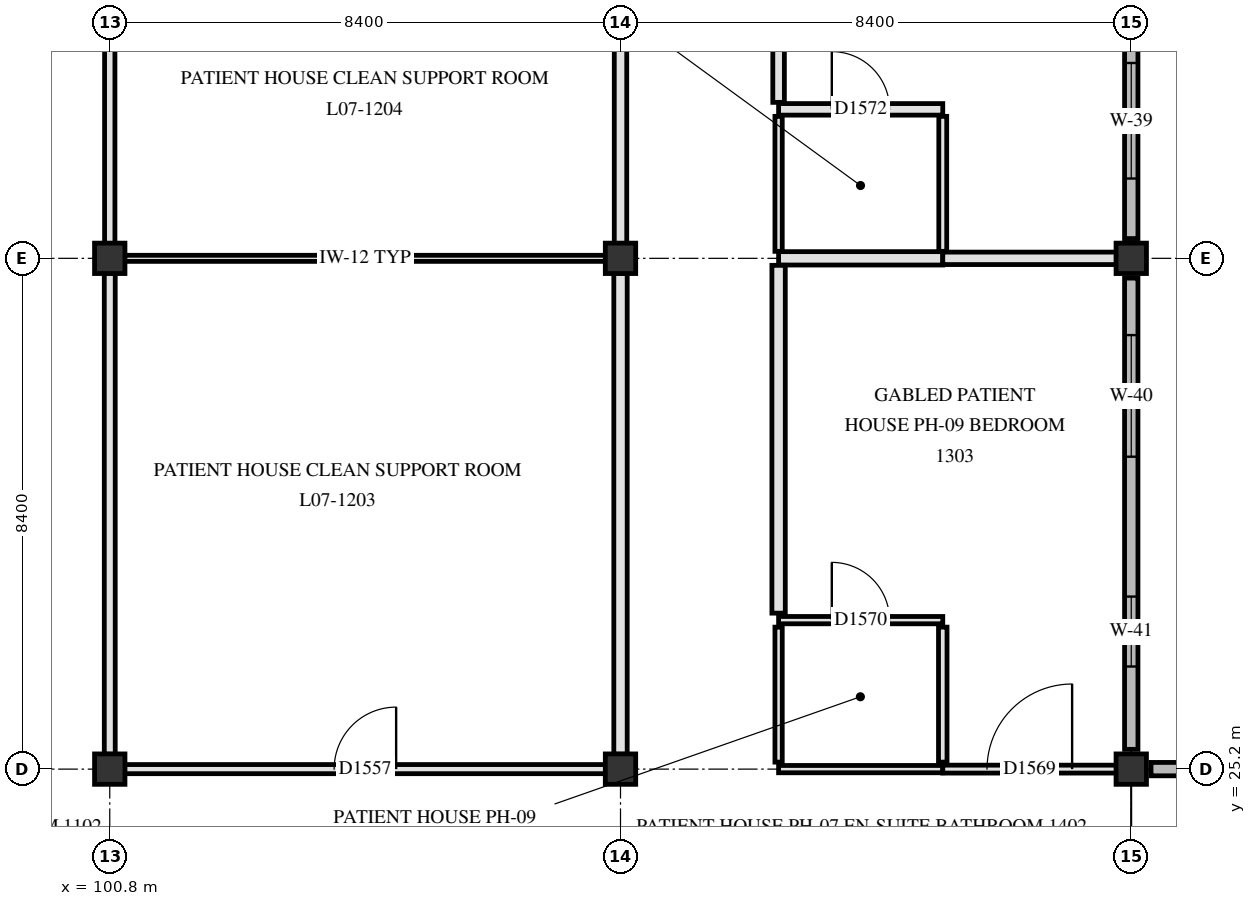
"""IFC4 building model, lengths in metres.
Left out: names, types, materials, properties, quantities, classifications, styles, units other than length and angle.
Written with IfcOpenShell. Run it as: python <this file> out.ifc"""

import sys

from ifc_helpers import new_model, si_unit, direction, frame, frame_2d, origin, origin_2d, place, context, subcontext, project, spatial, polyline, rectangle, outline, extrude, element, fill, save


model = new_model("IFC4")
c1 = context("Model", 3, precision=1e-05, world=origin(), true_north=direction((0.0, 1.0)))
c2 = subcontext(c1, "Body", "Model", "MODEL_VIEW")
j1 = project(units=[si_unit("LENGTHUNIT", "METRE"), si_unit("PLANEANGLEUNIT", "RADIAN")], contexts=[c1])
p1 = place(None, origin())
s1 = spatial("IfcSite", under=j1, at=p1, CompositionType="ELEMENT")
p2 = place(p1, origin())
s2 = spatial("IfcBuilding", under=s1, at=p2, CompositionType="ELEMENT")
p3 = place(p2, frame((0.0, 0.0, 30.3)))
s3 = spatial("IfcBuildingStorey", under=s2, at=p3, CompositionType="ELEMENT", Elevation=30.3)
for number, where, z_axis, x_axis in (
    (1, (100.8, 25.2, 0.0), (0.0, 0.0, 1.0), (1.0, 0.0, 0.0)),
    (2, (100.8, 33.6, 0.0), (0.0, 0.0, 1.0), (1.0, 0.0, 0.0)),
    (3, (109.2, 25.2, 0.0), (0.0, 0.0, 1.0), (1.0, 0.0, 0.0)),
    (4, (109.2, 33.6, 0.0), (0.0, 0.0, 1.0), (1.0, 0.0, 0.0)),
    (5, (117.6, 25.2, 0.0), (0.0, 0.0, 1.0), (1.0, 0.0, 0.0)),
    (6, (117.6, 33.6, 0.0), (0.0, 0.0, 1.0), (1.0, 0.0, 0.0)),
):
    element("IfcColumn", number, at=place(p3, frame(where, z_axis=z_axis, x_axis=x_axis)), inside=s3, PredefinedType="COLUMN", context=c2, shape_type="SweptSolid", body=[
        extrude(rectangle(XDim=0.5, YDim=0.5, at=origin_2d()), origin(), (0.0, 0.0, 1.0), 3.9),
    ])
p4 = place(p3, frame((117.6, 41.675, 0.0), z_axis=(0.0, 0.0, 1.0), x_axis=(0.0, -1.0, 0.0)))
e7 = element("IfcWall", 7, at=p4, inside=s3, PredefinedType="SOLIDWALL", context=c2, shape_type="SweptSolid", body=[
    extrude(outline(polyline([(0.0, 0.0), (7.75, 0.0), (7.75, 3.42), (3.875, 5.76), (0.0, 3.42), (0.0, 0.0)])), frame((0.0, 0.11, 0.0), z_axis=(0.0, -1.0, 0.0), x_axis=(1.0, 0.0, 0.0)), (0.0, 0.0, 1.0), 0.22),
])
p5 = place(p4, frame((1.038, 0.0, 0.85)))
e8 = element("IfcOpeningElement", 8, at=p5, cuts=e7, PredefinedType="OPENING", context=c2, shape_type="SweptSolid", body=[
    extrude(rectangle(XDim=1.8, YDim=1.66, at=frame_2d((0.9, 0.83))), frame((0.0, 0.12, 0.0), z_axis=(0.0, -1.0, 0.0), x_axis=(1.0, 0.0, 0.0)), (0.0, 0.0, 1.0), 0.24),
])
p6 = place(p4, frame((4.863, 0.0, 0.85)))
e9 = element("IfcOpeningElement", 9, at=p6, cuts=e7, PredefinedType="OPENING", context=c2, shape_type="SweptSolid", body=[
    extrude(rectangle(XDim=1.9, YDim=1.66, at=frame_2d((0.95, 0.83))), frame((0.0, 0.12, 0.0), z_axis=(0.0, -1.0, 0.0), x_axis=(1.0, 0.0, 0.0)), (0.0, 0.0, 1.0), 0.24),
])
p7 = place(p3, frame((117.6, 33.275, 0.0), z_axis=(0.0, 0.0, 1.0), x_axis=(0.0, -1.0, 0.0)))
e10 = element("IfcWall", 10, at=p7, inside=s3, PredefinedType="SOLIDWALL", context=c2, shape_type="SweptSolid", body=[
    extrude(outline(polyline([(0.0, 0.0), (7.75, 0.0), (7.75, 3.42), (3.875, 5.76), (0.0, 3.42), (0.0, 0.0)])), frame((0.0, 0.11, 0.0), z_axis=(0.0, -1.0, 0.0), x_axis=(1.0, 0.0, 0.0)), (0.0, 0.0, 1.0), 0.22),
])
p8 = place(p7, frame((0.938, 0.0, 0.85)))
e11 = element("IfcOpeningElement", 11, at=p8, cuts=e10, PredefinedType="OPENING", context=c2, shape_type="SweptSolid", body=[
    extrude(rectangle(XDim=2.0, YDim=1.66, at=frame_2d((1.0, 0.83))), frame((0.0, 0.12, 0.0), z_axis=(0.0, -1.0, 0.0), x_axis=(1.0, 0.0, 0.0)), (0.0, 0.0, 1.0), 0.24),
])
p9 = place(p7, frame((5.238, 0.0, 0.85)))
e12 = element("IfcOpeningElement", 12, at=p9, cuts=e10, PredefinedType="OPENING", context=c2, shape_type="SweptSolid", body=[
    extrude(rectangle(XDim=1.15, YDim=1.78, at=frame_2d((0.575, 0.89))), frame((0.0, 0.12, 0.0), z_axis=(0.0, -1.0, 0.0), x_axis=(1.0, 0.0, 0.0)), (0.0, 0.0, 1.0), 0.24),
])
p10 = place(p3, frame((117.925, 25.2, 0.0), z_axis=(0.0, 0.0, 1.0), x_axis=(1.0, 0.0, 0.0)))
e13 = element("IfcWall", 13, at=p10, inside=s3, PredefinedType="SOLIDWALL", context=c2, shape_type="SweptSolid", body=[
    extrude(outline(polyline([(0.0, 0.0), (7.75, 0.0), (7.75, 3.4), (3.875, 5.76), (0.0, 3.4), (0.0, 0.0)])), frame((0.0, 0.11, 0.0), z_axis=(0.0, -1.0, 0.0), x_axis=(1.0, 0.0, 0.0)), (0.0, 0.0, 1.0), 0.22),
])
p11 = place(p10, frame((1.288, 0.0, 0.85)))
e14 = element("IfcOpeningElement", 14, at=p11, cuts=e13, PredefinedType="OPENING", context=c2, shape_type="SweptSolid", body=[
    extrude(rectangle(XDim=1.3, YDim=1.78, at=frame_2d((0.65, 0.89))), frame((0.0, 0.12, 0.0), z_axis=(0.0, -1.0, 0.0), x_axis=(1.0, 0.0, 0.0)), (0.0, 0.0, 1.0), 0.24),
])
p12 = place(p10, frame((5.087, 0.0, 0.85)))
e15 = element("IfcOpeningElement", 15, at=p12, cuts=e13, PredefinedType="OPENING", context=c2, shape_type="SweptSolid", body=[
    extrude(rectangle(XDim=1.45, YDim=1.78, at=frame_2d((0.725, 0.89))), frame((0.0, 0.12, 0.0), z_axis=(0.0, -1.0, 0.0), x_axis=(1.0, 0.0, 0.0)), (0.0, 0.0, 1.0), 0.24),
])
p13 = place(p3, frame((101.045, 25.2, 0.0), z_axis=(0.0, 0.0, 1.0), x_axis=(1.0, 0.0, 0.0)))
e16 = element("IfcWall", 16, at=p13, inside=s3, PredefinedType="PARTITIONING", context=c2, shape_type="SweptSolid", body=[
    extrude(rectangle(XDim=7.91, YDim=0.15, at=frame_2d((3.955, 0.0))), origin(), (0.0, 0.0, 1.0), 3.25),
])
p14 = place(p13, frame((3.445, 0.0, 0.0)))
e17 = element("IfcOpeningElement", 17, at=p14, cuts=e16, PredefinedType="OPENING", context=c2, shape_type="SweptSolid", body=[
    extrude(rectangle(XDim=1.02, YDim=2.12, at=frame_2d((0.51, 1.06))), frame((0.0, 0.085, 0.0), z_axis=(0.0, -1.0, 0.0), x_axis=(1.0, 0.0, 0.0)), (0.0, 0.0, 1.0), 0.17),
])
p15 = place(p3, frame((111.8, 25.2, 0.0), z_axis=(0.0, 0.0, 1.0), x_axis=(1.0, 0.0, 0.0)))
e18 = element("IfcWall", 18, at=p15, inside=s3, PredefinedType="PARTITIONING", context=c2, shape_type="SweptSolid", body=[
    extrude(rectangle(XDim=2.7, YDim=0.12, at=frame_2d((1.35, 0.0))), origin(), (0.0, 0.0, 1.0), 3.25),
])
p16 = place(p3, frame((114.5, 25.2, 0.0), z_axis=(0.0, 0.0, 1.0), x_axis=(1.0, 0.0, 0.0)))
e19 = element("IfcWall", 19, at=p16, inside=s3, PredefinedType="PARTITIONING", context=c2, shape_type="SweptSolid", body=[
    extrude(rectangle(XDim=2.855, YDim=0.13, at=frame_2d((1.427, 0.0))), origin(), (0.0, 0.0, 1.0), 3.25),
])
p17 = place(p16, frame((0.728, 0.0, 0.0)))
e20 = element("IfcOpeningElement", 20, at=p17, cuts=e19, PredefinedType="OPENING", context=c2, shape_type="SweptSolid", body=[
    extrude(rectangle(XDim=1.4, YDim=2.2, at=frame_2d((0.7, 1.1))), frame((0.0, 0.075, 0.0), z_axis=(0.0, -1.0, 0.0), x_axis=(1.0, 0.0, 0.0)), (0.0, 0.0, 1.0), 0.15),
])
p18 = place(p3, frame((111.8, 27.65, 0.0), z_axis=(0.0, 0.0, 1.0), x_axis=(1.0, 0.0, 0.0)))
e21 = element("IfcWall", 21, at=p18, inside=s3, PredefinedType="PARTITIONING", context=c2, shape_type="SweptSolid", body=[
    extrude(rectangle(XDim=2.7, YDim=0.12, at=frame_2d((1.35, 0.0))), origin(), (0.0, 0.0, 1.0), 3.65),
])
p19 = place(p18, frame((0.875, 0.0, 0.0)))
e22 = element("IfcOpeningElement", 22, at=p19, cuts=e21, PredefinedType="OPENING", context=c2, shape_type="SweptSolid", body=[
    extrude(rectangle(XDim=0.95, YDim=2.1, at=frame_2d((0.475, 1.05))), frame((0.0, 0.07, 0.0), z_axis=(0.0, -1.0, 0.0), x_axis=(1.0, 0.0, 0.0)), (0.0, 0.0, 1.0), 0.14),
])
p20 = place(p3, frame((101.045, 33.6, 0.0), z_axis=(0.0, 0.0, 1.0), x_axis=(1.0, 0.0, 0.0)))
e23 = element("IfcWall", 23, at=p20, inside=s3, PredefinedType="PARTITIONING", context=c2, shape_type="SweptSolid", body=[
    extrude(rectangle(XDim=7.91, YDim=0.1, at=frame_2d((3.955, 0.0))), origin(), (0.0, 0.0, 1.0), 3.25),
])
p21 = place(p3, frame((111.8, 33.6, 0.0), z_axis=(0.0, 0.0, 1.0), x_axis=(1.0, 0.0, 0.0)))
e24 = element("IfcWall", 24, at=p21, inside=s3, PredefinedType="PARTITIONING", context=c2, shape_type="SweptSolid", body=[
    extrude(rectangle(XDim=2.7, YDim=0.22, at=frame_2d((1.35, 0.0))), origin(), (0.0, 0.0, 1.0), 3.25),
])
p22 = place(p3, frame((114.5, 33.6, 0.0), z_axis=(0.0, 0.0, 1.0), x_axis=(1.0, 0.0, 0.0)))
e25 = element("IfcWall", 25, at=p22, inside=s3, PredefinedType="PARTITIONING", context=c2, shape_type="SweptSolid", body=[
    extrude(rectangle(XDim=2.855, YDim=0.205, at=frame_2d((1.427, 0.0))), origin(), (0.0, 0.0, 1.0), 3.25),
])
p23 = place(p3, frame((111.8, 36.05, 0.0), z_axis=(0.0, 0.0, 1.0), x_axis=(1.0, 0.0, 0.0)))
e26 = element("IfcWall", 26, at=p23, inside=s3, PredefinedType="PARTITIONING", context=c2, shape_type="SweptSolid", body=[
    extrude(rectangle(XDim=2.7, YDim=0.19, at=frame_2d((1.35, 0.0))), origin(), (0.0, 0.0, 1.0), 3.65),
])
p24 = place(p23, frame((0.875, 0.0, 0.0)))
e27 = element("IfcOpeningElement", 27, at=p24, cuts=e26, PredefinedType="OPENING", context=c2, shape_type="SweptSolid", body=[
    extrude(rectangle(XDim=0.95, YDim=2.1, at=frame_2d((0.475, 1.05))), frame((0.0, 0.105, 0.0), z_axis=(0.0, -1.0, 0.0), x_axis=(1.0, 0.0, 0.0)), (0.0, 0.0, 1.0), 0.21),
])
p25 = place(p3, frame((100.8, 25.445, 0.0), z_axis=(0.0, 0.0, 1.0), x_axis=(0.0, 1.0, 0.0)))
e28 = element("IfcWall", 28, at=p25, inside=s3, PredefinedType="PARTITIONING", context=c2, shape_type="SweptSolid", body=[
    extrude(rectangle(XDim=7.91, YDim=0.18, at=frame_2d((3.955, 0.0))), origin(), (0.0, 0.0, 1.0), 3.25),
])
p26 = place(p3, frame((100.8, 33.845, 0.0), z_axis=(0.0, 0.0, 1.0), x_axis=(0.0, 1.0, 0.0)))
e29 = element("IfcWall", 29, at=p26, inside=s3, PredefinedType="PARTITIONING", context=c2, shape_type="SweptSolid", body=[
    extrude(rectangle(XDim=7.91, YDim=0.17, at=frame_2d((3.955, 0.0))), origin(), (0.0, 0.0, 1.0), 3.25),
])
p27 = place(p3, frame((109.2, 25.445, 0.0), z_axis=(0.0, 0.0, 1.0), x_axis=(0.0, 1.0, 0.0)))
e30 = element("IfcWall", 30, at=p27, inside=s3, PredefinedType="PARTITIONING", context=c2, shape_type="SweptSolid", body=[
    extrude(rectangle(XDim=7.91, YDim=0.22, at=frame_2d((3.955, 0.0))), origin(), (0.0, 0.0, 1.0), 3.25),
])
p28 = place(p3, frame((109.2, 33.845, 0.0), z_axis=(0.0, 0.0, 1.0), x_axis=(0.0, 1.0, 0.0)))
e31 = element("IfcWall", 31, at=p28, inside=s3, PredefinedType="PARTITIONING", context=c2, shape_type="SweptSolid", body=[
    extrude(rectangle(XDim=7.91, YDim=0.205, at=frame_2d((3.955, 0.0))), origin(), (0.0, 0.0, 1.0), 3.25),
])
p29 = place(p3, frame((111.8, 25.315, 0.0), z_axis=(0.0, 0.0, 1.0), x_axis=(0.0, 1.0, 0.0)))
e32 = element("IfcWall", 32, at=p29, inside=s3, PredefinedType="PARTITIONING", context=c2, shape_type="SweptSolid", body=[
    extrude(rectangle(XDim=2.22, YDim=0.12, at=frame_2d((1.11, 0.0))), origin(), (0.0, 0.0, 1.0), 3.65),
])
p30 = place(p3, frame((111.8, 27.765, 0.0), z_axis=(0.0, 0.0, 1.0), x_axis=(0.0, 1.0, 0.0)))
e33 = element("IfcWall", 33, at=p30, inside=s3, PredefinedType="PARTITIONING", context=c2, shape_type="SweptSolid", body=[
    extrude(rectangle(XDim=5.72, YDim=0.22, at=frame_2d((2.86, 0.0))), origin(), (0.0, 0.0, 1.0), 3.41),
])
p31 = place(p3, frame((111.8, 33.715, 0.0), z_axis=(0.0, 0.0, 1.0), x_axis=(0.0, 1.0, 0.0)))
e34 = element("IfcWall", 34, at=p31, inside=s3, PredefinedType="PARTITIONING", context=c2, shape_type="SweptSolid", body=[
    extrude(rectangle(XDim=2.22, YDim=0.12, at=frame_2d((1.11, 0.0))), origin(), (0.0, 0.0, 1.0), 3.65),
])
p32 = place(p3, frame((111.8, 36.165, 0.0), z_axis=(0.0, 0.0, 1.0), x_axis=(0.0, 1.0, 0.0)))
e35 = element("IfcWall", 35, at=p32, inside=s3, PredefinedType="PARTITIONING", context=c2, shape_type="SweptSolid", body=[
    extrude(rectangle(XDim=5.72, YDim=0.19, at=frame_2d((2.86, 0.0))), origin(), (0.0, 0.0, 1.0), 3.41),
])
p33 = place(p3, frame((114.5, 25.315, 0.0), z_axis=(0.0, 0.0, 1.0), x_axis=(0.0, 1.0, 0.0)))
e36 = element("IfcWall", 36, at=p33, inside=s3, PredefinedType="PARTITIONING", context=c2, shape_type="SweptSolid", body=[
    extrude(rectangle(XDim=2.22, YDim=0.14, at=frame_2d((1.11, 0.0))), origin(), (0.0, 0.0, 1.0), 3.65),
])
p34 = place(p3, frame((114.5, 33.715, 0.0), z_axis=(0.0, 0.0, 1.0), x_axis=(0.0, 1.0, 0.0)))
e37 = element("IfcWall", 37, at=p34, inside=s3, PredefinedType="PARTITIONING", context=c2, shape_type="SweptSolid", body=[
    extrude(rectangle(XDim=2.22, YDim=0.13, at=frame_2d((1.11, 0.0))), origin(), (0.0, 0.0, 1.0), 3.65),
])
p35 = place(p6, origin())
e38 = element("IfcWindow", 38, at=p35, inside=s3, PartitioningType="SINGLE_PANEL", PredefinedType="WINDOW", context=c2, shape_type="SweptSolid", body=[
    extrude(rectangle(XDim=1.9, YDim=1.66, at=frame_2d((0.95, 0.83))), frame((0.0, 0.03, 0.0), z_axis=(0.0, -1.0, 0.0), x_axis=(1.0, 0.0, 0.0)), (0.0, 0.0, 1.0), 0.06),
])
fill(e9, e38)
p36 = place(p8, origin())
e39 = element("IfcWindow", 39, at=p36, inside=s3, PartitioningType="SINGLE_PANEL", PredefinedType="WINDOW", context=c2, shape_type="SweptSolid", body=[
    extrude(rectangle(XDim=2.0, YDim=1.66, at=frame_2d((1.0, 0.83))), frame((0.0, 0.03, 0.0), z_axis=(0.0, -1.0, 0.0), x_axis=(1.0, 0.0, 0.0)), (0.0, 0.0, 1.0), 0.06),
])
fill(e11, e39)
p37 = place(p9, origin())
e40 = element("IfcWindow", 40, at=p37, inside=s3, PartitioningType="SINGLE_PANEL", PredefinedType="WINDOW", context=c2, shape_type="SweptSolid", body=[
    extrude(rectangle(XDim=1.15, YDim=1.78, at=frame_2d((0.575, 0.89))), frame((0.0, 0.03, 0.0), z_axis=(0.0, -1.0, 0.0), x_axis=(1.0, 0.0, 0.0)), (0.0, 0.0, 1.0), 0.06),
])
fill(e12, e40)
p38 = place(p14, origin())
e41 = element("IfcDoor", 41, at=p38, inside=s3, OperationType="SINGLE_SWING_RIGHT", PredefinedType="DOOR", context=c2, shape_type="SweptSolid", body=[
    extrude(rectangle(XDim=1.02, YDim=2.12, at=frame_2d((0.51, 1.06))), frame((0.0, 0.025, 0.0), z_axis=(0.0, -1.0, 0.0), x_axis=(1.0, 0.0, 0.0)), (0.0, 0.0, 1.0), 0.05),
])
fill(e17, e41)
p39 = place(p17, origin())
e42 = element("IfcDoor", 42, at=p39, inside=s3, OperationType="SINGLE_SWING_RIGHT", PredefinedType="DOOR", context=c2, shape_type="SweptSolid", body=[
    extrude(rectangle(XDim=1.4, YDim=2.2, at=frame_2d((0.7, 1.1))), frame((0.0, 0.025, 0.0), z_axis=(0.0, -1.0, 0.0), x_axis=(1.0, 0.0, 0.0)), (0.0, 0.0, 1.0), 0.05),
])
fill(e20, e42)
p40 = place(p19, origin())
e43 = element("IfcDoor", 43, at=p40, inside=s3, OperationType="SINGLE_SWING_LEFT", PredefinedType="DOOR", context=c2, shape_type="SweptSolid", body=[
    extrude(rectangle(XDim=0.95, YDim=2.1, at=frame_2d((0.475, 1.05))), frame((0.0, 0.025, 0.0), z_axis=(0.0, -1.0, 0.0), x_axis=(1.0, 0.0, 0.0)), (0.0, 0.0, 1.0), 0.05),
])
fill(e22, e43)
p41 = place(p24, origin())
e44 = element("IfcDoor", 44, at=p41, inside=s3, OperationType="SINGLE_SWING_LEFT", PredefinedType="DOOR", context=c2, shape_type="SweptSolid", body=[
    extrude(rectangle(XDim=0.95, YDim=2.1, at=frame_2d((0.475, 1.05))), frame((0.0, 0.025, 0.0), z_axis=(0.0, -1.0, 0.0), x_axis=(1.0, 0.0, 0.0)), (0.0, 0.0, 1.0), 0.05),
])
fill(e27, e44)
save(model, sys.argv[1])
